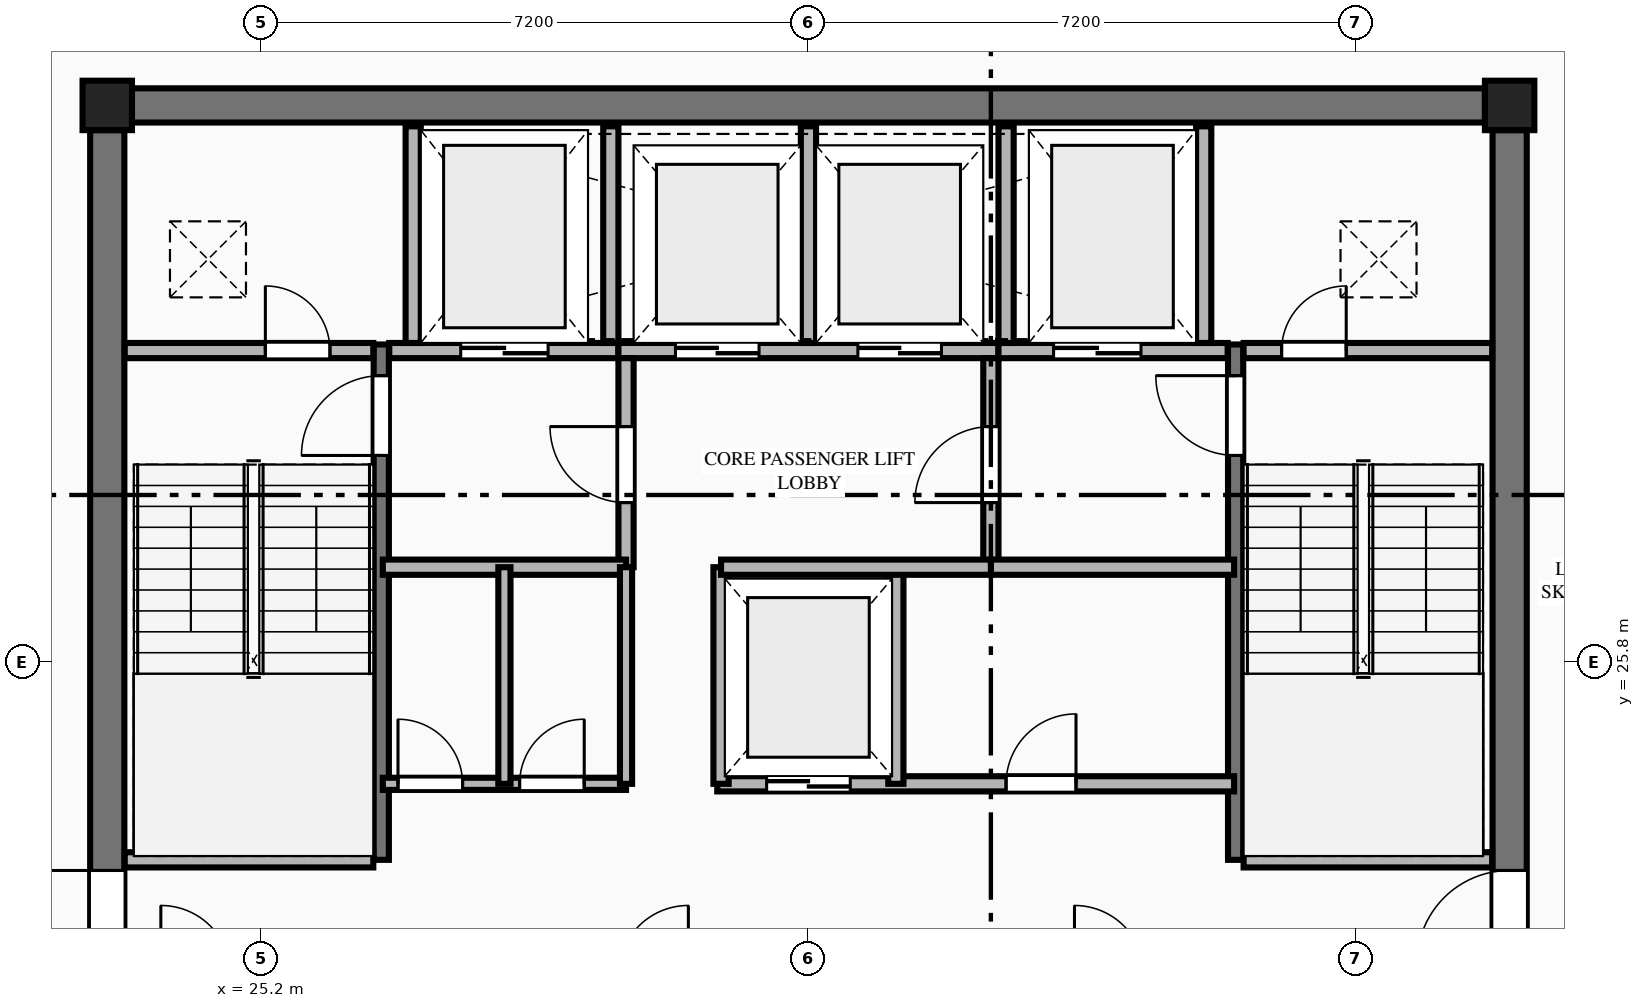
"""IFC4 building model, lengths in metres.
Left out: names, types, materials, properties, quantities, classifications, styles, units other than length and angle.
Written with IfcOpenShell. Run it as: python <this file> out.ifc"""

import sys

from ifc_helpers import new_model, si_unit, direction, frame, frame_2d, origin, origin_2d, place, context, subcontext, project, spatial, rectangle, extrude, element, fill, save


model = new_model("IFC4")
c1 = context("Model", 3, precision=1e-05, world=origin(), true_north=direction((0.0, 1.0)))
c2 = subcontext(c1, "Body", "Model", "MODEL_VIEW")
j1 = project(units=[si_unit("LENGTHUNIT", "METRE"), si_unit("PLANEANGLEUNIT", "RADIAN")], contexts=[c1])
p1 = place(None, origin())
s1 = spatial("IfcSite", under=j1, at=p1, CompositionType="ELEMENT")
p2 = place(p1, origin())
s2 = spatial("IfcBuilding", under=s1, at=p2, CompositionType="ELEMENT")
p3 = place(p2, frame((0.0, 0.0, 241.6)))
s3 = spatial("IfcBuildingStorey", under=s2, at=p3, CompositionType="ELEMENT", Elevation=241.6)
for number, where, z_axis, x_axis in (
    (1, (41.625, 33.125, 0.0), (0.0, 0.0, 1.0), (1.0, 0.0, 0.0)),
    (2, (23.175, 33.125, 0.0), (0.0, 0.0, 1.0), (1.0, 0.0, 0.0)),
):
    element("IfcColumn", number, at=place(p3, frame(where, z_axis=z_axis, x_axis=x_axis)), inside=s3, PredefinedType="COLUMN", context=c2, shape_type="SweptSolid", body=[
        extrude(rectangle(XDim=0.65, YDim=0.65, at=origin_2d()), origin(), (0.0, 0.0, 1.0), 3.65),
    ])
p4 = place(p3, frame((23.5, 33.125, 0.0), z_axis=(0.0, 0.0, 1.0), x_axis=(1.0, 0.0, 0.0)))
e3 = element("IfcWall", 3, at=p4, inside=s3, PredefinedType="SHEAR", context=c2, shape_type="SweptSolid", body=[
    extrude(rectangle(XDim=17.8, YDim=0.45, at=frame_2d((8.9, 0.0))), origin(), (0.0, 0.0, 1.0), 3.45),
])
p5 = place(p3, frame((23.175, 19.0, 0.0), z_axis=(0.0, 0.0, 1.0), x_axis=(0.0, 1.0, 0.0)))
e4 = element("IfcWall", 4, at=p5, inside=s3, PredefinedType="SHEAR", context=c2, shape_type="SweptSolid", body=[
    extrude(rectangle(XDim=13.8, YDim=0.45, at=frame_2d((6.9, 0.0))), origin(), (0.0, 0.0, 1.0), 3.45),
])
p6 = place(p5, frame((2.84, 0.0, 0.0)))
e5 = element("IfcOpeningElement", 5, at=p6, cuts=e4, PredefinedType="OPENING", context=c2, shape_type="SweptSolid", body=[
    extrude(rectangle(XDim=1.22, YDim=2.25, at=frame_2d((0.61, 1.125))), frame((0.0, 0.235, 0.0), z_axis=(0.0, -1.0, 0.0), x_axis=(1.0, 0.0, 0.0)), (0.0, 0.0, 1.0), 0.47),
])
p7 = place(p3, frame((41.625, 19.0, 0.0), z_axis=(0.0, 0.0, 1.0), x_axis=(0.0, 1.0, 0.0)))
e6 = element("IfcWall", 6, at=p7, inside=s3, PredefinedType="SHEAR", context=c2, shape_type="SweptSolid", body=[
    extrude(rectangle(XDim=13.8, YDim=0.45, at=frame_2d((6.9, 0.0))), origin(), (0.0, 0.0, 1.0), 3.45),
])
p8 = place(p7, frame((2.84, 0.0, 0.0)))
e7 = element("IfcOpeningElement", 7, at=p8, cuts=e6, PredefinedType="OPENING", context=c2, shape_type="SweptSolid", body=[
    extrude(rectangle(XDim=1.22, YDim=2.25, at=frame_2d((0.61, 1.125))), frame((0.0, 0.235, 0.0), z_axis=(0.0, -1.0, 0.0), x_axis=(1.0, 0.0, 0.0)), (0.0, 0.0, 1.0), 0.47),
])
p9 = place(p3, frame((26.78, 23.2, 0.0), z_axis=(0.0, 0.0, 1.0), x_axis=(0.0, 1.0, 0.0)))
e8 = element("IfcWall", 8, at=p9, inside=s3, PredefinedType="SHEAR", context=c2, shape_type="SweptSolid", body=[
    extrude(rectangle(XDim=6.78, YDim=0.2, at=frame_2d((3.39, 0.0))), origin(), (0.0, 0.0, 1.0), 3.65),
])
p10 = place(p9, frame((5.32, 0.0, 0.0)))
e9 = element("IfcOpeningElement", 9, at=p10, cuts=e8, PredefinedType="OPENING", context=c2, shape_type="SweptSolid", body=[
    extrude(rectangle(XDim=1.05, YDim=2.15, at=frame_2d((0.525, 1.075))), frame((0.0, 0.11, 0.0), z_axis=(0.0, -1.0, 0.0), x_axis=(1.0, 0.0, 0.0)), (0.0, 0.0, 1.0), 0.22),
])
p11 = place(p3, frame((23.405, 23.2, 0.0), z_axis=(0.0, 0.0, 1.0), x_axis=(1.0, 0.0, 0.0)))
e10 = element("IfcWall", 10, at=p11, inside=s3, PredefinedType="PLUMBINGWALL", context=c2, shape_type="SweptSolid", body=[
    extrude(rectangle(XDim=3.27, YDim=0.2, at=frame_2d((1.635, 0.0))), origin(), (0.0, 0.0, 1.0), 3.45),
])
p12 = place(p3, frame((38.02, 23.2, 0.0), z_axis=(0.0, 0.0, 1.0), x_axis=(0.0, 1.0, 0.0)))
e11 = element("IfcWall", 11, at=p12, inside=s3, PredefinedType="SHEAR", context=c2, shape_type="SweptSolid", body=[
    extrude(rectangle(XDim=6.78, YDim=0.2, at=frame_2d((3.39, 0.0))), origin(), (0.0, 0.0, 1.0), 3.65),
])
p13 = place(p12, frame((5.32, 0.0, 0.0)))
e12 = element("IfcOpeningElement", 12, at=p13, cuts=e11, PredefinedType="OPENING", context=c2, shape_type="SweptSolid", body=[
    extrude(rectangle(XDim=1.05, YDim=2.15, at=frame_2d((0.525, 1.075))), frame((0.0, 0.11, 0.0), z_axis=(0.0, -1.0, 0.0), x_axis=(1.0, 0.0, 0.0)), (0.0, 0.0, 1.0), 0.22),
])
p14 = place(p3, frame((38.125, 23.2, 0.0), z_axis=(0.0, 0.0, 1.0), x_axis=(1.0, 0.0, 0.0)))
e13 = element("IfcWall", 13, at=p14, inside=s3, PredefinedType="PLUMBINGWALL", context=c2, shape_type="SweptSolid", body=[
    extrude(rectangle(XDim=3.27, YDim=0.2, at=frame_2d((1.635, 0.0))), origin(), (0.0, 0.0, 1.0), 3.45),
])
p15 = place(p3, frame((23.405, 29.9, 0.0), z_axis=(0.0, 0.0, 1.0), x_axis=(1.0, 0.0, 0.0)))
e14 = element("IfcWall", 14, at=p15, inside=s3, PredefinedType="PLUMBINGWALL", context=c2, shape_type="SweptSolid", body=[
    extrude(rectangle(XDim=3.27, YDim=0.2, at=frame_2d((1.635, 0.0))), origin(), (0.0, 0.0, 1.0), 3.45),
])
p16 = place(p15, frame((1.85, 0.0, 0.0)))
e15 = element("IfcOpeningElement", 15, at=p16, cuts=e14, PredefinedType="OPENING", context=c2, shape_type="SweptSolid", body=[
    extrude(rectangle(XDim=0.85, YDim=2.05, at=frame_2d((0.425, 1.025))), frame((0.0, 0.11, 0.0), z_axis=(0.0, -1.0, 0.0), x_axis=(1.0, 0.0, 0.0)), (0.0, 0.0, 1.0), 0.22),
])
p17 = place(p3, frame((26.885, 29.9, 0.0), z_axis=(0.0, 0.0, 1.0), x_axis=(1.0, 0.0, 0.0)))
e16 = element("IfcWall", 16, at=p17, inside=s3, PredefinedType="PLUMBINGWALL", context=c2, shape_type="SweptSolid", body=[
    extrude(rectangle(XDim=3.015, YDim=0.2, at=frame_2d((1.507, 0.0))), origin(), (0.0, 0.0, 1.0), 3.45),
])
p18 = place(p17, frame((0.94, 0.0, 0.0)))
e17 = element("IfcOpeningElement", 17, at=p18, cuts=e16, PredefinedType="OPENING", context=c2, shape_type="SweptSolid", body=[
    extrude(rectangle(XDim=1.15, YDim=2.2, at=frame_2d((0.575, 1.1))), frame((0.0, 0.11, 0.0), z_axis=(0.0, -1.0, 0.0), x_axis=(1.0, 0.0, 0.0)), (0.0, 0.0, 1.0), 0.22),
])
p19 = place(p3, frame((29.9, 29.9, 0.0), z_axis=(0.0, 0.0, 1.0), x_axis=(1.0, 0.0, 0.0)))
e18 = element("IfcWall", 18, at=p19, inside=s3, PredefinedType="PLUMBINGWALL", context=c2, shape_type="SweptSolid", body=[
    extrude(rectangle(XDim=5.0, YDim=0.2, at=frame_2d((2.5, 0.0))), origin(), (0.0, 0.0, 1.0), 3.45),
])
p20 = place(p19, frame((0.75, 0.0, 0.0)))
e19 = element("IfcOpeningElement", 19, at=p20, cuts=e18, PredefinedType="OPENING", context=c2, shape_type="SweptSolid", body=[
    extrude(rectangle(XDim=1.1, YDim=2.2, at=frame_2d((0.55, 1.1))), frame((0.0, 0.11, 0.0), z_axis=(0.0, -1.0, 0.0), x_axis=(1.0, 0.0, 0.0)), (0.0, 0.0, 1.0), 0.22),
])
p21 = place(p19, frame((3.15, 0.0, 0.0)))
e20 = element("IfcOpeningElement", 20, at=p21, cuts=e18, PredefinedType="OPENING", context=c2, shape_type="SweptSolid", body=[
    extrude(rectangle(XDim=1.1, YDim=2.2, at=frame_2d((0.55, 1.1))), frame((0.0, 0.11, 0.0), z_axis=(0.0, -1.0, 0.0), x_axis=(1.0, 0.0, 0.0)), (0.0, 0.0, 1.0), 0.22),
])
p22 = place(p3, frame((34.9, 29.9, 0.0), z_axis=(0.0, 0.0, 1.0), x_axis=(1.0, 0.0, 0.0)))
e21 = element("IfcWall", 21, at=p22, inside=s3, PredefinedType="PLUMBINGWALL", context=c2, shape_type="SweptSolid", body=[
    extrude(rectangle(XDim=3.015, YDim=0.2, at=frame_2d((1.508, 0.0))), origin(), (0.0, 0.0, 1.0), 3.45),
])
p23 = place(p22, frame((0.725, 0.0, 0.0)))
e22 = element("IfcOpeningElement", 22, at=p23, cuts=e21, PredefinedType="OPENING", context=c2, shape_type="SweptSolid", body=[
    extrude(rectangle(XDim=1.15, YDim=2.2, at=frame_2d((0.575, 1.1))), frame((0.0, 0.11, 0.0), z_axis=(0.0, -1.0, 0.0), x_axis=(1.0, 0.0, 0.0)), (0.0, 0.0, 1.0), 0.22),
])
p24 = place(p3, frame((38.125, 29.9, 0.0), z_axis=(0.0, 0.0, 1.0), x_axis=(1.0, 0.0, 0.0)))
e23 = element("IfcWall", 23, at=p24, inside=s3, PredefinedType="PLUMBINGWALL", context=c2, shape_type="SweptSolid", body=[
    extrude(rectangle(XDim=3.27, YDim=0.2, at=frame_2d((1.635, 0.0))), origin(), (0.0, 0.0, 1.0), 3.45),
])
p25 = place(p24, frame((0.5, 0.0, 0.0)))
e24 = element("IfcOpeningElement", 24, at=p25, cuts=e23, PredefinedType="OPENING", context=c2, shape_type="SweptSolid", body=[
    extrude(rectangle(XDim=0.85, YDim=2.05, at=frame_2d((0.425, 1.025))), frame((0.0, 0.11, 0.0), z_axis=(0.0, -1.0, 0.0), x_axis=(1.0, 0.0, 0.0)), (0.0, 0.0, 1.0), 0.22),
])
for number, where, z_axis, x_axis in (
    (25, (27.2, 30.0, 0.0), (0.0, 0.0, 1.0), (0.0, 1.0, 0.0)),
    (26, (29.8, 30.0, 0.0), (0.0, 0.0, 1.0), (0.0, 1.0, 0.0)),
    (27, (32.4, 30.0, 0.0), (0.0, 0.0, 1.0), (0.0, 1.0, 0.0)),
    (28, (35.0, 30.0, 0.0), (0.0, 0.0, 1.0), (0.0, 1.0, 0.0)),
    (29, (37.6, 30.0, 0.0), (0.0, 0.0, 1.0), (0.0, 1.0, 0.0)),
):
    element("IfcWall", number, at=place(p3, frame(where, z_axis=z_axis, x_axis=x_axis)), inside=s3, PredefinedType="PLUMBINGWALL", context=c2, shape_type="SweptSolid", body=[
        extrude(rectangle(XDim=2.85, YDim=0.2, at=frame_2d((1.425, 0.0))), origin(), (0.0, 0.0, 1.0), 3.45),
    ])
p26 = place(p3, frame((30.0, 27.05, 0.0), z_axis=(0.0, 0.0, 1.0), x_axis=(0.0, 1.0, 0.0)))
e30 = element("IfcWall", 30, at=p26, inside=s3, PredefinedType="PLUMBINGWALL", context=c2, shape_type="SweptSolid", body=[
    extrude(rectangle(XDim=2.75, YDim=0.2, at=frame_2d((1.375, 0.0))), origin(), (0.0, 0.0, 1.0), 3.45),
])
p27 = place(p26, frame((0.85, 0.0, 0.0)))
e31 = element("IfcOpeningElement", 31, at=p27, cuts=e30, PredefinedType="OPENING", context=c2, shape_type="SweptSolid", body=[
    extrude(rectangle(XDim=1.0, YDim=2.15, at=frame_2d((0.5, 1.075))), frame((0.0, 0.11, 0.0), z_axis=(0.0, -1.0, 0.0), x_axis=(1.0, 0.0, 0.0)), (0.0, 0.0, 1.0), 0.22),
])
p28 = place(p3, frame((26.8, 27.05, 0.0), z_axis=(0.0, 0.0, 1.0), x_axis=(1.0, 0.0, 0.0)))
e32 = element("IfcWall", 32, at=p28, inside=s3, PredefinedType="PLUMBINGWALL", context=c2, shape_type="SweptSolid", body=[
    extrude(rectangle(XDim=3.2, YDim=0.2, at=frame_2d((1.6, 0.0))), origin(), (0.0, 0.0, 1.0), 3.45),
])
p29 = place(p3, frame((34.8, 27.05, 0.0), z_axis=(0.0, 0.0, 1.0), x_axis=(0.0, 1.0, 0.0)))
e33 = element("IfcWall", 33, at=p29, inside=s3, PredefinedType="PLUMBINGWALL", context=c2, shape_type="SweptSolid", body=[
    extrude(rectangle(XDim=2.75, YDim=0.2, at=frame_2d((1.375, 0.0))), origin(), (0.0, 0.0, 1.0), 3.45),
])
p30 = place(p29, frame((0.85, 0.0, 0.0)))
e34 = element("IfcOpeningElement", 34, at=p30, cuts=e33, PredefinedType="OPENING", context=c2, shape_type="SweptSolid", body=[
    extrude(rectangle(XDim=1.0, YDim=2.15, at=frame_2d((0.5, 1.075))), frame((0.0, 0.11, 0.0), z_axis=(0.0, -1.0, 0.0), x_axis=(1.0, 0.0, 0.0)), (0.0, 0.0, 1.0), 0.22),
])
p31 = place(p3, frame((34.8, 27.05, 0.0), z_axis=(0.0, 0.0, 1.0), x_axis=(1.0, 0.0, 0.0)))
e35 = element("IfcWall", 35, at=p31, inside=s3, PredefinedType="PLUMBINGWALL", context=c2, shape_type="SweptSolid", body=[
    extrude(rectangle(XDim=3.2, YDim=0.2, at=frame_2d((1.6, 0.0))), origin(), (0.0, 0.0, 1.0), 3.45),
])
p32 = place(p3, frame((26.8, 24.2, 0.0), z_axis=(0.0, 0.0, 1.0), x_axis=(1.0, 0.0, 0.0)))
e36 = element("IfcWall", 36, at=p32, inside=s3, PredefinedType="PARTITIONING", context=c2, shape_type="SweptSolid", body=[
    extrude(rectangle(XDim=3.2, YDim=0.16, at=frame_2d((1.6, 0.0))), origin(), (0.0, 0.0, 1.0), 3.45),
])
p33 = place(p32, frame((0.2, 0.0, 0.0)))
e37 = element("IfcOpeningElement", 37, at=p33, cuts=e36, PredefinedType="OPENING", context=c2, shape_type="SweptSolid", body=[
    extrude(rectangle(XDim=0.85, YDim=2.05, at=frame_2d((0.425, 1.025))), frame((0.0, 0.09, 0.0), z_axis=(0.0, -1.0, 0.0), x_axis=(1.0, 0.0, 0.0)), (0.0, 0.0, 1.0), 0.18),
])
p34 = place(p32, frame((1.8, 0.0, 0.0)))
e38 = element("IfcOpeningElement", 38, at=p34, cuts=e36, PredefinedType="OPENING", context=c2, shape_type="SweptSolid", body=[
    extrude(rectangle(XDim=0.85, YDim=2.05, at=frame_2d((0.425, 1.025))), frame((0.0, 0.09, 0.0), z_axis=(0.0, -1.0, 0.0), x_axis=(1.0, 0.0, 0.0)), (0.0, 0.0, 1.0), 0.18),
])
p35 = place(p3, frame((30.0, 24.2, 0.0), z_axis=(0.0, 0.0, 1.0), x_axis=(0.0, 1.0, 0.0)))
e39 = element("IfcWall", 39, at=p35, inside=s3, PredefinedType="PARTITIONING", context=c2, shape_type="SweptSolid", body=[
    extrude(rectangle(XDim=2.85, YDim=0.16, at=frame_2d((1.425, 0.0))), origin(), (0.0, 0.0, 1.0), 3.45),
])
p36 = place(p3, frame((31.2, 24.2, 0.0), z_axis=(0.0, 0.0, 1.0), x_axis=(1.0, 0.0, 0.0)))
e40 = element("IfcWall", 40, at=p36, inside=s3, PredefinedType="PLUMBINGWALL", context=c2, shape_type="SweptSolid", body=[
    extrude(rectangle(XDim=6.8, YDim=0.2, at=frame_2d((3.4, 0.0))), origin(), (0.0, 0.0, 1.0), 3.45),
])
p37 = place(p36, frame((0.65, 0.0, 0.0)))
e41 = element("IfcOpeningElement", 41, at=p37, cuts=e40, PredefinedType="OPENING", context=c2, shape_type="SweptSolid", body=[
    extrude(rectangle(XDim=1.1, YDim=2.2, at=frame_2d((0.55, 1.1))), frame((0.0, 0.11, 0.0), z_axis=(0.0, -1.0, 0.0), x_axis=(1.0, 0.0, 0.0)), (0.0, 0.0, 1.0), 0.22),
])
p38 = place(p36, frame((3.8, 0.0, 0.0)))
e42 = element("IfcOpeningElement", 42, at=p38, cuts=e40, PredefinedType="OPENING", context=c2, shape_type="SweptSolid", body=[
    extrude(rectangle(XDim=0.92, YDim=2.15, at=frame_2d((0.46, 1.075))), frame((0.0, 0.11, 0.0), z_axis=(0.0, -1.0, 0.0), x_axis=(1.0, 0.0, 0.0)), (0.0, 0.0, 1.0), 0.22),
])
for number, where, z_axis, x_axis in (
    (43, (31.25, 24.2, 0.0), (0.0, 0.0, 1.0), (0.0, 1.0, 0.0)),
    (44, (33.55, 24.2, 0.0), (0.0, 0.0, 1.0), (0.0, 1.0, 0.0)),
):
    element("IfcWall", number, at=place(p3, frame(where, z_axis=z_axis, x_axis=x_axis)), inside=s3, PredefinedType="PLUMBINGWALL", context=c2, shape_type="SweptSolid", body=[
        extrude(rectangle(XDim=2.85, YDim=0.2, at=frame_2d((1.425, 0.0))), origin(), (0.0, 0.0, 1.0), 3.45),
    ])
p39 = place(p3, frame((31.25, 27.05, 0.0), z_axis=(0.0, 0.0, 1.0), x_axis=(1.0, 0.0, 0.0)))
e45 = element("IfcWall", 45, at=p39, inside=s3, PredefinedType="PLUMBINGWALL", context=c2, shape_type="SweptSolid", body=[
    extrude(rectangle(XDim=3.55, YDim=0.2, at=frame_2d((1.775, 0.0))), origin(), (0.0, 0.0, 1.0), 3.45),
])
p40 = place(p3, frame((28.4, 24.2, 0.0), z_axis=(0.0, 0.0, 1.0), x_axis=(0.0, 1.0, 0.0)))
e46 = element("IfcWall", 46, at=p40, inside=s3, PredefinedType="PARTITIONING", context=c2, shape_type="SweptSolid", body=[
    extrude(rectangle(XDim=2.85, YDim=0.16, at=frame_2d((1.425, 0.0))), origin(), (0.0, 0.0, 1.0), 3.45),
])
p41 = place(p6, origin())
e47 = element("IfcDoor", 47, at=p41, inside=s3, OperationType="SINGLE_SWING_RIGHT", PredefinedType="DOOR", context=c2, shape_type="SweptSolid", body=[
    extrude(rectangle(XDim=1.22, YDim=2.25, at=frame_2d((0.61, 1.125))), frame((0.0, 0.025, 0.0), z_axis=(0.0, -1.0, 0.0), x_axis=(1.0, 0.0, 0.0)), (0.0, 0.0, 1.0), 0.05),
])
fill(e5, e47)
p42 = place(p8, origin())
e48 = element("IfcDoor", 48, at=p42, inside=s3, OperationType="SINGLE_SWING_LEFT", PredefinedType="DOOR", context=c2, shape_type="SweptSolid", body=[
    extrude(rectangle(XDim=1.22, YDim=2.25, at=frame_2d((0.61, 1.125))), frame((0.0, 0.025, 0.0), z_axis=(0.0, -1.0, 0.0), x_axis=(1.0, 0.0, 0.0)), (0.0, 0.0, 1.0), 0.05),
])
fill(e7, e48)
p43 = place(p10, origin())
e49 = element("IfcDoor", 49, at=p43, inside=s3, OperationType="SINGLE_SWING_LEFT", PredefinedType="DOOR", context=c2, shape_type="SweptSolid", body=[
    extrude(rectangle(XDim=1.05, YDim=2.15, at=frame_2d((0.525, 1.075))), frame((0.0, 0.025, 0.0), z_axis=(0.0, -1.0, 0.0), x_axis=(1.0, 0.0, 0.0)), (0.0, 0.0, 1.0), 0.05),
])
fill(e9, e49)
p44 = place(p13, origin())
e50 = element("IfcDoor", 50, at=p44, inside=s3, OperationType="SINGLE_SWING_RIGHT", PredefinedType="DOOR", context=c2, shape_type="SweptSolid", body=[
    extrude(rectangle(XDim=1.05, YDim=2.15, at=frame_2d((0.525, 1.075))), frame((0.0, 0.025, 0.0), z_axis=(0.0, -1.0, 0.0), x_axis=(1.0, 0.0, 0.0)), (0.0, 0.0, 1.0), 0.05),
])
fill(e12, e50)
p45 = place(p16, origin())
e51 = element("IfcDoor", 51, at=p45, inside=s3, OperationType="SINGLE_SWING_LEFT", PredefinedType="DOOR", context=c2, shape_type="SweptSolid", body=[
    extrude(rectangle(XDim=0.85, YDim=2.05, at=frame_2d((0.425, 1.025))), frame((0.0, 0.025, 0.0), z_axis=(0.0, -1.0, 0.0), x_axis=(1.0, 0.0, 0.0)), (0.0, 0.0, 1.0), 0.05),
])
fill(e15, e51)
p46 = place(p25, origin())
e52 = element("IfcDoor", 52, at=p46, inside=s3, OperationType="SINGLE_SWING_RIGHT", PredefinedType="DOOR", context=c2, shape_type="SweptSolid", body=[
    extrude(rectangle(XDim=0.85, YDim=2.05, at=frame_2d((0.425, 1.025))), frame((0.0, 0.025, 0.0), z_axis=(0.0, -1.0, 0.0), x_axis=(1.0, 0.0, 0.0)), (0.0, 0.0, 1.0), 0.05),
])
fill(e24, e52)
p47 = place(p18, origin())
e53 = element("IfcDoor", 53, at=p47, inside=s3, OperationType="DOUBLE_DOOR_SLIDING", PredefinedType="DOOR", context=c2, shape_type="SweptSolid", body=[
    extrude(rectangle(XDim=1.15, YDim=2.2, at=frame_2d((0.575, 1.1))), frame((0.0, 0.025, 0.0), z_axis=(0.0, -1.0, 0.0), x_axis=(1.0, 0.0, 0.0)), (0.0, 0.0, 1.0), 0.05),
])
fill(e17, e53)
p48 = place(p23, origin())
e54 = element("IfcDoor", 54, at=p48, inside=s3, OperationType="DOUBLE_DOOR_SLIDING", PredefinedType="DOOR", context=c2, shape_type="SweptSolid", body=[
    extrude(rectangle(XDim=1.15, YDim=2.2, at=frame_2d((0.575, 1.1))), frame((0.0, 0.025, 0.0), z_axis=(0.0, -1.0, 0.0), x_axis=(1.0, 0.0, 0.0)), (0.0, 0.0, 1.0), 0.05),
])
fill(e22, e54)
p49 = place(p20, origin())
e55 = element("IfcDoor", 55, at=p49, inside=s3, OperationType="DOUBLE_DOOR_SLIDING", PredefinedType="DOOR", context=c2, shape_type="SweptSolid", body=[
    extrude(rectangle(XDim=1.1, YDim=2.2, at=frame_2d((0.55, 1.1))), frame((0.0, 0.025, 0.0), z_axis=(0.0, -1.0, 0.0), x_axis=(1.0, 0.0, 0.0)), (0.0, 0.0, 1.0), 0.05),
])
fill(e19, e55)
p50 = place(p21, origin())
e56 = element("IfcDoor", 56, at=p50, inside=s3, OperationType="DOUBLE_DOOR_SLIDING", PredefinedType="DOOR", context=c2, shape_type="SweptSolid", body=[
    extrude(rectangle(XDim=1.1, YDim=2.2, at=frame_2d((0.55, 1.1))), frame((0.0, 0.025, 0.0), z_axis=(0.0, -1.0, 0.0), x_axis=(1.0, 0.0, 0.0)), (0.0, 0.0, 1.0), 0.05),
])
fill(e20, e56)
p51 = place(p27, origin())
e57 = element("IfcDoor", 57, at=p51, inside=s3, OperationType="SINGLE_SWING_RIGHT", PredefinedType="DOOR", context=c2, shape_type="SweptSolid", body=[
    extrude(rectangle(XDim=1.0, YDim=2.15, at=frame_2d((0.5, 1.075))), frame((0.0, 0.025, 0.0), z_axis=(0.0, -1.0, 0.0), x_axis=(1.0, 0.0, 0.0)), (0.0, 0.0, 1.0), 0.05),
])
fill(e31, e57)
p52 = place(p30, origin())
e58 = element("IfcDoor", 58, at=p52, inside=s3, OperationType="SINGLE_SWING_LEFT", PredefinedType="DOOR", context=c2, shape_type="SweptSolid", body=[
    extrude(rectangle(XDim=1.0, YDim=2.15, at=frame_2d((0.5, 1.075))), frame((0.0, 0.025, 0.0), z_axis=(0.0, -1.0, 0.0), x_axis=(1.0, 0.0, 0.0)), (0.0, 0.0, 1.0), 0.05),
])
fill(e34, e58)
p53 = place(p37, origin())
e59 = element("IfcDoor", 59, at=p53, inside=s3, OperationType="DOUBLE_DOOR_SLIDING", PredefinedType="DOOR", context=c2, shape_type="SweptSolid", body=[
    extrude(rectangle(XDim=1.1, YDim=2.2, at=frame_2d((0.55, 1.1))), frame((0.0, 0.025, 0.0), z_axis=(0.0, -1.0, 0.0), x_axis=(1.0, 0.0, 0.0)), (0.0, 0.0, 1.0), 0.05),
])
fill(e41, e59)
p54 = place(p33, origin())
e60 = element("IfcDoor", 60, at=p54, inside=s3, OperationType="SINGLE_SWING_LEFT", PredefinedType="DOOR", context=c2, shape_type="SweptSolid", body=[
    extrude(rectangle(XDim=0.85, YDim=2.05, at=frame_2d((0.425, 1.025))), frame((0.0, 0.025, 0.0), z_axis=(0.0, -1.0, 0.0), x_axis=(1.0, 0.0, 0.0)), (0.0, 0.0, 1.0), 0.05),
])
fill(e37, e60)
p55 = place(p34, origin())
e61 = element("IfcDoor", 61, at=p55, inside=s3, OperationType="SINGLE_SWING_RIGHT", PredefinedType="DOOR", context=c2, shape_type="SweptSolid", body=[
    extrude(rectangle(XDim=0.85, YDim=2.05, at=frame_2d((0.425, 1.025))), frame((0.0, 0.025, 0.0), z_axis=(0.0, -1.0, 0.0), x_axis=(1.0, 0.0, 0.0)), (0.0, 0.0, 1.0), 0.05),
])
fill(e38, e61)
p56 = place(p38, origin())
e62 = element("IfcDoor", 62, at=p56, inside=s3, OperationType="SINGLE_SWING_RIGHT", PredefinedType="DOOR", context=c2, shape_type="SweptSolid", body=[
    extrude(rectangle(XDim=0.92, YDim=2.15, at=frame_2d((0.46, 1.075))), frame((0.0, 0.025, 0.0), z_axis=(0.0, -1.0, 0.0), x_axis=(1.0, 0.0, 0.0)), (0.0, 0.0, 1.0), 0.05),
])
fill(e42, e62)
save(model, sys.argv[1])
